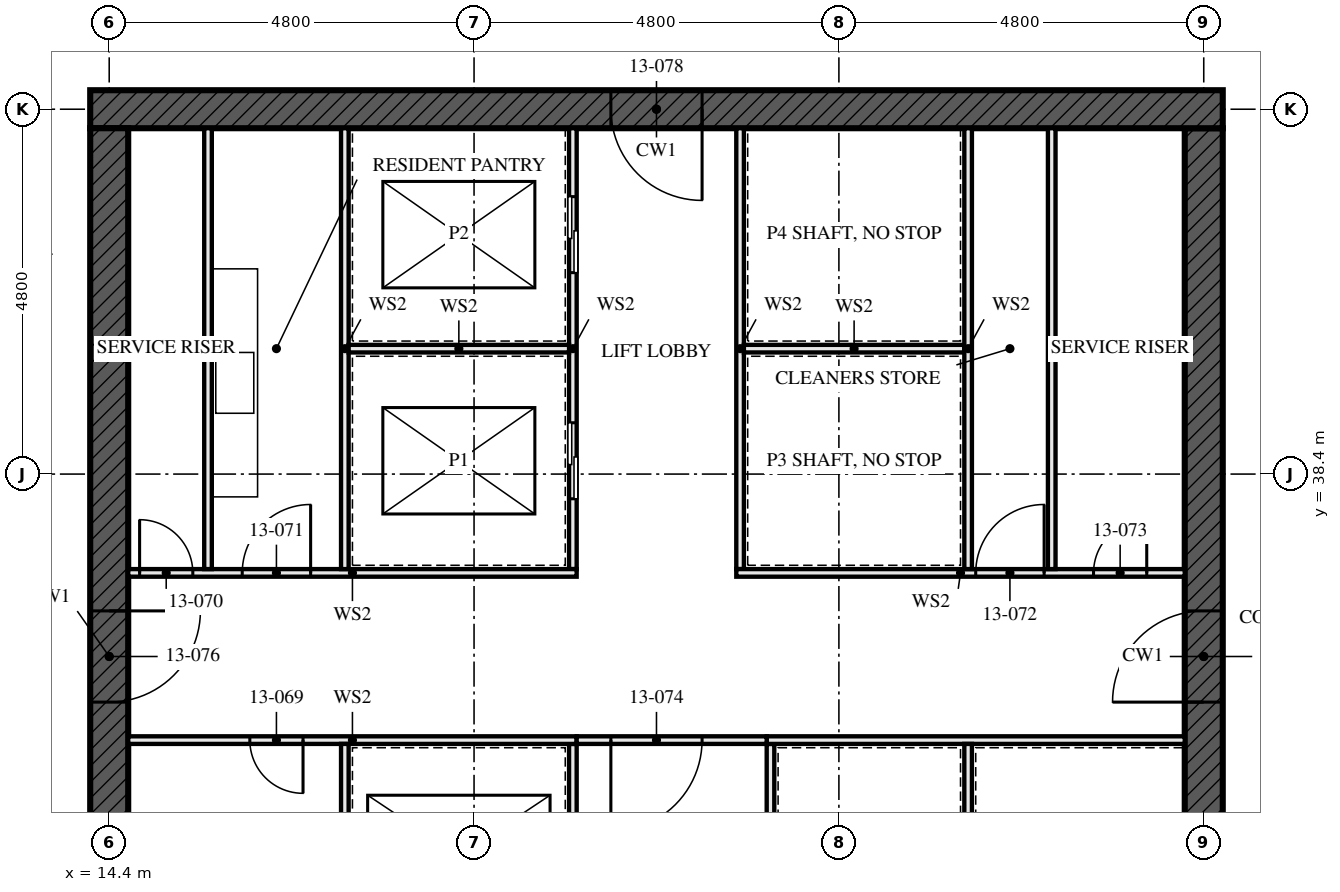
"""IFC4 building model, lengths in metres.
Left out: names, types, materials, properties, quantities, classifications, styles, units other than length and angle.
Written with IfcOpenShell. Run it as: python <this file> out.ifc"""

import sys

from ifc_helpers import new_model, si_unit, direction, frame, frame_2d, origin, place, context, subcontext, project, spatial, rectangle, extrude, element, fill, save


model = new_model("IFC4")
c1 = context("Model", 3, precision=1e-05, world=origin(), true_north=direction((0.0, 1.0)))
c2 = subcontext(c1, "Body", "Model", "MODEL_VIEW")
j1 = project(units=[si_unit("LENGTHUNIT", "METRE"), si_unit("PLANEANGLEUNIT", "RADIAN")], contexts=[c1])
p1 = place(None, origin())
s1 = spatial("IfcSite", under=j1, at=p1, CompositionType="ELEMENT")
p2 = place(p1, origin())
s2 = spatial("IfcBuilding", under=s1, at=p2, CompositionType="ELEMENT")
p3 = place(p2, frame((0.0, 0.0, 51.5)))
s3 = spatial("IfcBuildingStorey", under=s2, at=p3, CompositionType="ELEMENT", Elevation=51.5)
p4 = place(p3, frame((29.05, 43.2, -0.17), z_axis=(0.0, 0.0, 1.0), x_axis=(-1.0, 0.0, 0.0)))
e1 = element("IfcWall", 1, at=p4, inside=s3, PredefinedType="SHEAR", context=c2, shape_type="SweptSolid", body=[
    extrude(rectangle(XDim=14.9, YDim=0.5, at=frame_2d((7.45, 0.0))), origin(), (0.0, 0.0, 1.0), 3.5),
])
p5 = place(p4, frame((6.85, 0.0, 0.17)))
e2 = element("IfcOpeningElement", 2, at=p5, cuts=e1, PredefinedType="OPENING", context=c2, shape_type="SweptSolid", body=[
    extrude(rectangle(XDim=1.2, YDim=2.1, at=frame_2d((0.6, 1.05))), frame((0.0, 0.26, 0.0), z_axis=(0.0, -1.0, 0.0), x_axis=(1.0, 0.0, 0.0)), (0.0, 0.0, 1.0), 0.521),
])
p6 = place(p3, frame((14.4, 42.95, -0.17), z_axis=(0.0, 0.0, 1.0), x_axis=(0.0, -1.0, 0.0)))
e3 = element("IfcWall", 3, at=p6, inside=s3, PredefinedType="SHEAR", context=c2, shape_type="SweptSolid", body=[
    extrude(rectangle(XDim=13.9, YDim=0.5, at=frame_2d((6.95, 0.0))), origin(), (0.0, 0.0, 1.0), 3.5),
])
p7 = place(p6, frame((6.35, 0.0, 0.17)))
e4 = element("IfcOpeningElement", 4, at=p7, cuts=e3, PredefinedType="OPENING", context=c2, shape_type="SweptSolid", body=[
    extrude(rectangle(XDim=1.2, YDim=2.1, at=frame_2d((0.6, 1.05))), frame((0.0, 0.26, 0.0), z_axis=(0.0, -1.0, 0.0), x_axis=(1.0, 0.0, 0.0)), (0.0, 0.0, 1.0), 0.521),
])
p8 = place(p3, frame((28.8, 29.05, -0.17), z_axis=(0.0, 0.0, 1.0), x_axis=(0.0, 1.0, 0.0)))
e5 = element("IfcWall", 5, at=p8, inside=s3, PredefinedType="SHEAR", context=c2, shape_type="SweptSolid", body=[
    extrude(rectangle(XDim=13.9, YDim=0.5, at=frame_2d((6.95, 0.0))), origin(), (0.0, 0.0, 1.0), 3.5),
])
p9 = place(p8, frame((6.35, 0.0, 0.17)))
e6 = element("IfcOpeningElement", 6, at=p9, cuts=e5, PredefinedType="OPENING", context=c2, shape_type="SweptSolid", body=[
    extrude(rectangle(XDim=1.2, YDim=2.1, at=frame_2d((0.6, 1.05))), frame((0.0, 0.26, 0.0), z_axis=(0.0, -1.0, 0.0), x_axis=(1.0, 0.0, 0.0)), (0.0, 0.0, 1.0), 0.521),
])
for number, where, z_axis, x_axis in (
    (7, (15.7, 37.15, 0.0), (0.0, 0.0, 1.0), (0.0, 1.0, 0.0)),
    (8, (26.8, 37.15, 0.0), (0.0, 0.0, 1.0), (0.0, 1.0, 0.0)),
):
    element("IfcWall", number, at=place(p3, frame(where, z_axis=z_axis, x_axis=x_axis)), inside=s3, PredefinedType="SOLIDWALL", context=c2, shape_type="SweptSolid", body=[
        extrude(rectangle(XDim=5.8, YDim=0.1, at=frame_2d((2.9, 0.0))), origin(), (0.0, 0.0, 1.0), 3.33),
    ])
p10 = place(p3, frame((20.5, 29.05, 0.0), z_axis=(0.0, 0.0, 1.0), x_axis=(0.0, 1.0, 0.0)))
e9 = element("IfcWall", 9, at=p10, inside=s3, PredefinedType="SOLIDWALL", context=c2, shape_type="SweptSolid", body=[
    extrude(rectangle(XDim=5.8, YDim=0.1, at=frame_2d((2.9, 0.0))), origin(), (0.0, 0.0, 1.0), 3.33),
])
p11 = place(p10, frame((0.8, 0.0, 0.0)))
e10 = element("IfcOpeningElement", 10, at=p11, cuts=e9, PredefinedType="OPENING", context=c2, shape_type="SweptSolid", body=[
    extrude(rectangle(XDim=1.1, YDim=2.3, at=frame_2d((0.55, 1.15))), frame((0.0, 0.061, 0.0), z_axis=(0.0, -1.0, 0.0), x_axis=(1.0, 0.0, 0.0)), (0.0, 0.0, 1.0), 0.121),
])
p12 = place(p10, frame((3.775, 0.0, 0.0)))
e11 = element("IfcOpeningElement", 11, at=p12, cuts=e9, PredefinedType="OPENING", context=c2, shape_type="SweptSolid", body=[
    extrude(rectangle(XDim=1.1, YDim=2.3, at=frame_2d((0.55, 1.15))), frame((0.0, 0.061, 0.0), z_axis=(0.0, -1.0, 0.0), x_axis=(1.0, 0.0, 0.0)), (0.0, 0.0, 1.0), 0.121),
])
p13 = place(p3, frame((20.5, 37.15, 0.0), z_axis=(0.0, 0.0, 1.0), x_axis=(0.0, 1.0, 0.0)))
e12 = element("IfcWall", 12, at=p13, inside=s3, PredefinedType="SOLIDWALL", context=c2, shape_type="SweptSolid", body=[
    extrude(rectangle(XDim=5.8, YDim=0.1, at=frame_2d((2.9, 0.0))), origin(), (0.0, 0.0, 1.0), 3.33),
])
p14 = place(p13, frame((0.925, 0.0, 0.0)))
e13 = element("IfcOpeningElement", 13, at=p14, cuts=e12, PredefinedType="OPENING", context=c2, shape_type="SweptSolid", body=[
    extrude(rectangle(XDim=1.0, YDim=2.1, at=frame_2d((0.5, 1.05))), frame((0.0, 0.061, 0.0), z_axis=(0.0, -1.0, 0.0), x_axis=(1.0, 0.0, 0.0)), (0.0, 0.0, 1.0), 0.121),
])
p15 = place(p13, frame((3.9, 0.0, 0.0)))
e14 = element("IfcOpeningElement", 14, at=p15, cuts=e12, PredefinedType="OPENING", context=c2, shape_type="SweptSolid", body=[
    extrude(rectangle(XDim=1.0, YDim=2.1, at=frame_2d((0.5, 1.05))), frame((0.0, 0.061, 0.0), z_axis=(0.0, -1.0, 0.0), x_axis=(1.0, 0.0, 0.0)), (0.0, 0.0, 1.0), 0.121),
])
p16 = place(p3, frame((22.7, 37.15, 0.0), z_axis=(0.0, 0.0, 1.0), x_axis=(0.0, 1.0, 0.0)))
e15 = element("IfcWall", 15, at=p16, inside=s3, PredefinedType="SOLIDWALL", context=c2, shape_type="SweptSolid", body=[
    extrude(rectangle(XDim=5.8, YDim=0.1, at=frame_2d((2.9, 0.0))), origin(), (0.0, 0.0, 1.0), 3.33),
])
p17 = place(p3, frame((23.1, 29.05, 0.0), z_axis=(0.0, 0.0, 1.0), x_axis=(0.0, 1.0, 0.0)))
e16 = element("IfcWall", 16, at=p17, inside=s3, PredefinedType="SOLIDWALL", context=c2, shape_type="SweptSolid", body=[
    extrude(rectangle(XDim=5.8, YDim=0.1, at=frame_2d((2.9, 0.0))), origin(), (0.0, 0.0, 1.0), 3.33),
])
p18 = place(p17, frame((1.0, 0.0, 0.0)))
e17 = element("IfcOpeningElement", 17, at=p18, cuts=e16, PredefinedType="OPENING", context=c2, shape_type="SweptSolid", body=[
    extrude(rectangle(XDim=0.7, YDim=2.1, at=frame_2d((0.35, 1.05))), frame((0.0, 0.061, 0.0), z_axis=(0.0, -1.0, 0.0), x_axis=(1.0, 0.0, 0.0)), (0.0, 0.0, 1.0), 0.121),
])
p19 = place(p3, frame((14.65, 34.9, 0.0), z_axis=(0.0, 0.0, 1.0), x_axis=(1.0, 0.0, 0.0)))
e18 = element("IfcWall", 18, at=p19, inside=s3, PredefinedType="SOLIDWALL", context=c2, shape_type="SweptSolid", body=[
    extrude(rectangle(XDim=5.9, YDim=0.1, at=frame_2d((2.95, 0.0))), origin(), (0.0, 0.0, 1.0), 3.33),
])
p20 = place(p19, frame((1.6, 0.0, 0.0)))
e19 = element("IfcOpeningElement", 19, at=p20, cuts=e18, PredefinedType="OPENING", context=c2, shape_type="SweptSolid", body=[
    extrude(rectangle(XDim=0.7, YDim=2.1, at=frame_2d((0.35, 1.05))), frame((0.0, 0.061, 0.0), z_axis=(0.0, -1.0, 0.0), x_axis=(1.0, 0.0, 0.0)), (0.0, 0.0, 1.0), 0.121),
])
p21 = place(p3, frame((23.05, 34.9, 0.0), z_axis=(0.0, 0.0, 1.0), x_axis=(1.0, 0.0, 0.0)))
e20 = element("IfcWall", 20, at=p21, inside=s3, PredefinedType="SOLIDWALL", context=c2, shape_type="SweptSolid", body=[
    extrude(rectangle(XDim=5.5, YDim=0.1, at=frame_2d((2.75, 0.0))), origin(), (0.0, 0.0, 1.0), 3.33),
])
p22 = place(p3, frame((14.65, 37.1, 0.0), z_axis=(0.0, 0.0, 1.0), x_axis=(1.0, 0.0, 0.0)))
e21 = element("IfcWall", 21, at=p22, inside=s3, PredefinedType="SOLIDWALL", context=c2, shape_type="SweptSolid", body=[
    extrude(rectangle(XDim=5.9, YDim=0.1, at=frame_2d((2.95, 0.0))), origin(), (0.0, 0.0, 1.0), 3.33),
])
p23 = place(p22, frame((0.15, 0.0, 0.0)))
e22 = element("IfcOpeningElement", 22, at=p23, cuts=e21, PredefinedType="OPENING", context=c2, shape_type="SweptSolid", body=[
    extrude(rectangle(XDim=0.7, YDim=2.1, at=frame_2d((0.35, 1.05))), frame((0.0, 0.061, 0.0), z_axis=(0.0, -1.0, 0.0), x_axis=(1.0, 0.0, 0.0)), (0.0, 0.0, 1.0), 0.121),
])
p24 = place(p22, frame((1.5, 0.0, 0.0)))
e23 = element("IfcOpeningElement", 23, at=p24, cuts=e21, PredefinedType="OPENING", context=c2, shape_type="SweptSolid", body=[
    extrude(rectangle(XDim=0.9, YDim=2.1, at=frame_2d((0.45, 1.05))), frame((0.0, 0.061, 0.0), z_axis=(0.0, -1.0, 0.0), x_axis=(1.0, 0.0, 0.0)), (0.0, 0.0, 1.0), 0.121),
])
p25 = place(p3, frame((22.65, 37.1, 0.0), z_axis=(0.0, 0.0, 1.0), x_axis=(1.0, 0.0, 0.0)))
e24 = element("IfcWall", 24, at=p25, inside=s3, PredefinedType="SOLIDWALL", context=c2, shape_type="SweptSolid", body=[
    extrude(rectangle(XDim=5.9, YDim=0.1, at=frame_2d((2.95, 0.0))), origin(), (0.0, 0.0, 1.0), 3.33),
])
p26 = place(p25, frame((3.15, 0.0, 0.0)))
e25 = element("IfcOpeningElement", 25, at=p26, cuts=e24, PredefinedType="OPENING", context=c2, shape_type="SweptSolid", body=[
    extrude(rectangle(XDim=0.9, YDim=2.1, at=frame_2d((0.45, 1.05))), frame((0.0, 0.061, 0.0), z_axis=(0.0, -1.0, 0.0), x_axis=(1.0, 0.0, 0.0)), (0.0, 0.0, 1.0), 0.121),
])
p27 = place(p25, frame((4.7, 0.0, 0.0)))
e26 = element("IfcOpeningElement", 26, at=p27, cuts=e24, PredefinedType="OPENING", context=c2, shape_type="SweptSolid", body=[
    extrude(rectangle(XDim=0.7, YDim=2.1, at=frame_2d((0.35, 1.05))), frame((0.0, 0.061, 0.0), z_axis=(0.0, -1.0, 0.0), x_axis=(1.0, 0.0, 0.0)), (0.0, 0.0, 1.0), 0.121),
])
p28 = place(p3, frame((20.55, 34.9, 0.0), z_axis=(0.0, 0.0, 1.0), x_axis=(1.0, 0.0, 0.0)))
e27 = element("IfcWall", 27, at=p28, inside=s3, PredefinedType="SOLIDWALL", context=c2, shape_type="SweptSolid", body=[
    extrude(rectangle(XDim=2.5, YDim=0.1, at=frame_2d((1.25, 0.0))), origin(), (0.0, 0.0, 1.0), 3.33),
])
p29 = place(p28, frame((0.45, 0.0, 0.0)))
e28 = element("IfcOpeningElement", 28, at=p29, cuts=e27, PredefinedType="OPENING", context=c2, shape_type="SweptSolid", body=[
    extrude(rectangle(XDim=1.2, YDim=2.1, at=frame_2d((0.6, 1.05))), frame((0.0, 0.061, 0.0), z_axis=(0.0, -1.0, 0.0), x_axis=(1.0, 0.0, 0.0)), (0.0, 0.0, 1.0), 0.121),
])
for number, where, z_axis, x_axis in (
    (29, (17.5, 29.05, 0.0), (0.0, 0.0, 1.0), (0.0, 1.0, 0.0)),
    (30, (17.5, 37.15, 0.0), (0.0, 0.0, 1.0), (0.0, 1.0, 0.0)),
):
    element("IfcWall", number, at=place(p3, frame(where, z_axis=z_axis, x_axis=x_axis)), inside=s3, PredefinedType="SOLIDWALL", context=c2, shape_type="SweptSolid", body=[
        extrude(rectangle(XDim=5.8, YDim=0.1, at=frame_2d((2.9, 0.0))), origin(), (0.0, 0.0, 1.0), 3.33),
    ])
for number, where, z_axis, x_axis in (
    (31, (17.55, 40.05, 0.0), (0.0, 0.0, 1.0), (1.0, 0.0, 0.0)),
    (32, (22.75, 40.05, 0.0), (0.0, 0.0, 1.0), (1.0, 0.0, 0.0)),
):
    element("IfcWall", number, at=place(p3, frame(where, z_axis=z_axis, x_axis=x_axis)), inside=s3, PredefinedType="SOLIDWALL", context=c2, shape_type="SweptSolid", body=[
        extrude(rectangle(XDim=2.9, YDim=0.1, at=frame_2d((1.45, 0.0))), origin(), (0.0, 0.0, 1.0), 3.33),
    ])
p30 = place(p3, frame((25.7, 37.15, 0.0), z_axis=(0.0, 0.0, 1.0), x_axis=(0.0, 1.0, 0.0)))
e33 = element("IfcWall", 33, at=p30, inside=s3, PredefinedType="SOLIDWALL", context=c2, shape_type="SweptSolid", body=[
    extrude(rectangle(XDim=5.8, YDim=0.1, at=frame_2d((2.9, 0.0))), origin(), (0.0, 0.0, 1.0), 3.33),
])
p31 = place(p3, frame((25.7, 31.95, 0.0), z_axis=(0.0, 0.0, 1.0), x_axis=(0.0, 1.0, 0.0)))
e34 = element("IfcWall", 34, at=p31, inside=s3, PredefinedType="SOLIDWALL", context=c2, shape_type="SweptSolid", body=[
    extrude(rectangle(XDim=2.9, YDim=0.1, at=frame_2d((1.45, 0.0))), origin(), (0.0, 0.0, 1.0), 3.33),
])
p32 = place(p14, origin())
e35 = element("IfcDoor", 35, at=p32, inside=s3, OperationType="SLIDING_TO_LEFT", PredefinedType="DOOR", context=c2, shape_type="SweptSolid", body=[
    extrude(rectangle(XDim=1.0, YDim=2.1, at=frame_2d((0.5, 1.05))), frame((0.0, 0.05, 0.0), z_axis=(0.0, -1.0, 0.0), x_axis=(1.0, 0.0, 0.0)), (0.0, 0.0, 1.0), 0.1),
])
fill(e13, e35)
p33 = place(p15, origin())
e36 = element("IfcDoor", 36, at=p33, inside=s3, OperationType="SLIDING_TO_LEFT", PredefinedType="DOOR", context=c2, shape_type="SweptSolid", body=[
    extrude(rectangle(XDim=1.0, YDim=2.1, at=frame_2d((0.5, 1.05))), frame((0.0, 0.05, 0.0), z_axis=(0.0, -1.0, 0.0), x_axis=(1.0, 0.0, 0.0)), (0.0, 0.0, 1.0), 0.1),
])
fill(e14, e36)
p34 = place(p20, frame((0.7, 0.0, 0.0), z_axis=(0.0, 0.0, 1.0), x_axis=(-1.0, 0.0, 0.0)))
e37 = element("IfcDoor", 37, at=p34, inside=s3, OperationType="SINGLE_SWING_RIGHT", PredefinedType="DOOR", context=c2, shape_type="SweptSolid", body=[
    extrude(rectangle(XDim=0.7, YDim=2.1, at=frame_2d((0.35, 1.05))), frame((0.0, 0.027, 0.0), z_axis=(0.0, -1.0, 0.0), x_axis=(1.0, 0.0, 0.0)), (0.0, 0.0, 1.0), 0.054),
])
fill(e19, e37)
p35 = place(p23, origin())
e38 = element("IfcDoor", 38, at=p35, inside=s3, OperationType="SINGLE_SWING_RIGHT", PredefinedType="DOOR", context=c2, shape_type="SweptSolid", body=[
    extrude(rectangle(XDim=0.7, YDim=2.1, at=frame_2d((0.35, 1.05))), frame((0.0, 0.027, 0.0), z_axis=(0.0, -1.0, 0.0), x_axis=(1.0, 0.0, 0.0)), (0.0, 0.0, 1.0), 0.054),
])
fill(e22, e38)
p36 = place(p24, origin())
e39 = element("IfcDoor", 39, at=p36, inside=s3, OperationType="SINGLE_SWING_LEFT", PredefinedType="DOOR", context=c2, shape_type="SweptSolid", body=[
    extrude(rectangle(XDim=0.9, YDim=2.1, at=frame_2d((0.45, 1.05))), frame((0.0, 0.027, 0.0), z_axis=(0.0, -1.0, 0.0), x_axis=(1.0, 0.0, 0.0)), (0.0, 0.0, 1.0), 0.054),
])
fill(e23, e39)
p37 = place(p26, origin())
e40 = element("IfcDoor", 40, at=p37, inside=s3, OperationType="SINGLE_SWING_LEFT", PredefinedType="DOOR", context=c2, shape_type="SweptSolid", body=[
    extrude(rectangle(XDim=0.9, YDim=2.1, at=frame_2d((0.45, 1.05))), frame((0.0, 0.027, 0.0), z_axis=(0.0, -1.0, 0.0), x_axis=(1.0, 0.0, 0.0)), (0.0, 0.0, 1.0), 0.054),
])
fill(e25, e40)
p38 = place(p27, origin())
e41 = element("IfcDoor", 41, at=p38, inside=s3, OperationType="SINGLE_SWING_LEFT", PredefinedType="DOOR", context=c2, shape_type="SweptSolid", body=[
    extrude(rectangle(XDim=0.7, YDim=2.1, at=frame_2d((0.35, 1.05))), frame((0.0, 0.027, 0.0), z_axis=(0.0, -1.0, 0.0), x_axis=(1.0, 0.0, 0.0)), (0.0, 0.0, 1.0), 0.054),
])
fill(e26, e41)
p39 = place(p29, frame((1.2, 0.0, 0.0), z_axis=(0.0, 0.0, 1.0), x_axis=(-1.0, 0.0, 0.0)))
e42 = element("IfcDoor", 42, at=p39, inside=s3, OperationType="SINGLE_SWING_LEFT", PredefinedType="DOOR", context=c2, shape_type="SweptSolid", body=[
    extrude(rectangle(XDim=1.2, YDim=2.1, at=frame_2d((0.6, 1.05))), frame((0.0, 0.027, 0.0), z_axis=(0.0, -1.0, 0.0), x_axis=(1.0, 0.0, 0.0)), (0.0, 0.0, 1.0), 0.054),
])
fill(e28, e42)
p40 = place(p7, origin())
e43 = element("IfcDoor", 43, at=p40, inside=s3, OperationType="SINGLE_SWING_LEFT", PredefinedType="DOOR", context=c2, shape_type="SweptSolid", body=[
    extrude(rectangle(XDim=1.2, YDim=2.1, at=frame_2d((0.6, 1.05))), frame((0.0, 0.027, 0.0), z_axis=(0.0, -1.0, 0.0), x_axis=(1.0, 0.0, 0.0)), (0.0, 0.0, 1.0), 0.054),
])
fill(e4, e43)
p41 = place(p9, origin())
e44 = element("IfcDoor", 44, at=p41, inside=s3, OperationType="SINGLE_SWING_LEFT", PredefinedType="DOOR", context=c2, shape_type="SweptSolid", body=[
    extrude(rectangle(XDim=1.2, YDim=2.1, at=frame_2d((0.6, 1.05))), frame((0.0, 0.027, 0.0), z_axis=(0.0, -1.0, 0.0), x_axis=(1.0, 0.0, 0.0)), (0.0, 0.0, 1.0), 0.054),
])
fill(e6, e44)
p42 = place(p5, origin())
e45 = element("IfcDoor", 45, at=p42, inside=s3, OperationType="SINGLE_SWING_LEFT", PredefinedType="DOOR", context=c2, shape_type="SweptSolid", body=[
    extrude(rectangle(XDim=1.2, YDim=2.1, at=frame_2d((0.6, 1.05))), frame((0.0, 0.027, 0.0), z_axis=(0.0, -1.0, 0.0), x_axis=(1.0, 0.0, 0.0)), (0.0, 0.0, 1.0), 0.054),
])
fill(e2, e45)
save(model, sys.argv[1])
